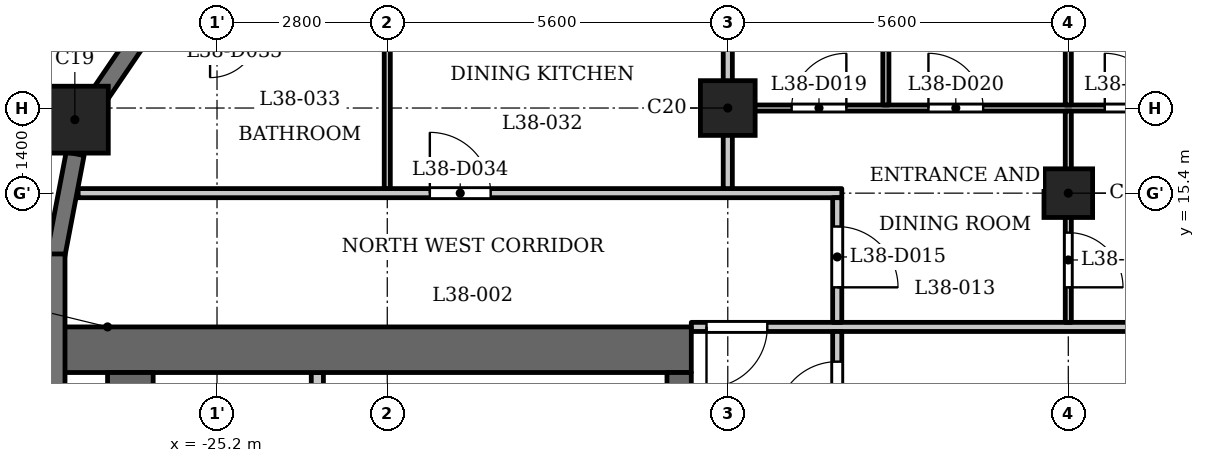
"""IFC4 building model, lengths in metres.
Left out: names, types, materials, properties, quantities, classifications, styles, units other than length and angle.
Written with IfcOpenShell. Run it as: python <this file> out.ifc"""

import sys

from ifc_helpers import new_model, si_unit, direction, frame, frame_2d, origin, origin_2d, place, context, subcontext, project, spatial, rectangle, extrude, element, fill, save


model = new_model("IFC4")
c1 = context("Model", 3, precision=1e-05, world=origin(), true_north=direction((0.0, 1.0)))
c2 = subcontext(c1, "Body", "Model", "MODEL_VIEW")
j1 = project(units=[si_unit("LENGTHUNIT", "METRE"), si_unit("PLANEANGLEUNIT", "RADIAN")], contexts=[c1])
p1 = place(None, origin())
s1 = spatial("IfcSite", under=j1, at=p1, CompositionType="ELEMENT")
p2 = place(p1, origin())
s2 = spatial("IfcBuilding", under=s1, at=p2, CompositionType="ELEMENT")
p3 = place(p2, frame((0.0, 0.0, 150.1)))
s3 = spatial("IfcBuildingStorey", under=s2, at=p3, CompositionType="ELEMENT", Elevation=150.1)
p4 = place(p3, frame((-27.538, 16.609, 0.0), z_axis=(0.0, 0.0, 1.0), x_axis=(1.0, 0.0, 0.0)))
e1 = element("IfcColumn", 1, at=p4, inside=s3, PredefinedType="COLUMN", context=c2, shape_type="SweptSolid", body=[
    extrude(rectangle(XDim=1.1, YDim=1.1, at=origin_2d()), origin(), (0.0, 0.0, 1.0), 3.5),
])
p5 = place(p3, frame((-16.8, 16.8, 0.0), z_axis=(0.0, 0.0, 1.0), x_axis=(1.0, 0.0, 0.0)))
e2 = element("IfcColumn", 2, at=p5, inside=s3, PredefinedType="COLUMN", context=c2, shape_type="SweptSolid", body=[
    extrude(rectangle(XDim=0.9, YDim=0.9, at=origin_2d()), origin(), (0.0, 0.0, 1.0), 3.5),
])
p6 = place(p3, frame((-11.2, 15.4, 0.0), z_axis=(0.0, 0.0, 1.0), x_axis=(1.0, 0.0, 0.0)))
e3 = element("IfcColumn", 3, at=p6, inside=s3, PredefinedType="COLUMN", context=c2, shape_type="SweptSolid", body=[
    extrude(rectangle(XDim=0.8, YDim=0.8, at=origin_2d()), origin(), (0.0, 0.0, 1.0), 3.5),
])
p7 = place(p3, frame((-26.532, 17.893, 0.0), z_axis=(0.0, 0.0, 1.0), x_axis=(-0.562105419172, -0.82706559458, 0.0)))
e4 = element("IfcWall", 4, at=p7, inside=s3, PredefinedType="SOLIDWALL", context=c2, shape_type="SweptSolid", body=[
    extrude(rectangle(XDim=1.077, YDim=0.3, at=frame_2d((0.539, 0.0))), origin(), (0.0, 0.0, 1.0), 3.2),
])
p8 = place(p3, frame((-27.533, 16.048, 0.0), z_axis=(0.0, 0.0, 1.0), x_axis=(-0.187302784601, -0.982302227871, 0.0)))
e5 = element("IfcWall", 5, at=p8, inside=s3, PredefinedType="SOLIDWALL", context=c2, shape_type="SweptSolid", body=[
    extrude(rectangle(XDim=1.706, YDim=0.3, at=frame_2d((0.853, 0.0))), origin(), (0.0, 0.0, 1.0), 2.45),
])
p9 = place(p3, frame((-27.85, 14.4, 0.0), z_axis=(0.0, 0.0, 1.0), x_axis=(0.0, -1.0, 0.0)))
e6 = element("IfcWall", 6, at=p9, inside=s3, PredefinedType="SOLIDWALL", context=c2, shape_type="SweptSolid", body=[
    extrude(rectangle(XDim=2.65, YDim=0.3, at=frame_2d((1.325, 0.0))), origin(), (0.0, 0.0, 1.0), 2.45),
])
p10 = place(p3, frame((-17.4, 12.825, 0.0), z_axis=(0.0, 0.0, 1.0), x_axis=(-1.0, 0.0, 0.0)))
e7 = element("IfcWall", 7, at=p10, inside=s3, PredefinedType="SHEAR", context=c2, shape_type="SweptSolid", body=[
    extrude(rectangle(XDim=10.4, YDim=0.75, at=frame_2d((5.2, 0.0))), origin(), (0.0, 0.0, 1.0), 3.2),
])
p11 = place(p3, frame((-17.6, -12.45, 0.0), z_axis=(0.0, 0.0, 1.0), x_axis=(0.0, 1.0, 0.0)))
e8 = element("IfcWall", 8, at=p11, inside=s3, PredefinedType="SHEAR", context=c2, shape_type="SweptSolid", body=[
    extrude(rectangle(XDim=24.9, YDim=0.4, at=frame_2d((12.45, 0.0))), origin(), (0.0, 0.0, 1.0), 3.2),
])
p12 = place(p11, frame((6.325, 0.0, 0.0)))
e9 = element("IfcOpeningElement", 9, at=p12, cuts=e8, PredefinedType="OPENING", context=c2, shape_type="SweptSolid", body=[
    extrude(rectangle(XDim=0.9, YDim=2.1, at=frame_2d((0.45, 1.05))), frame((0.0, 0.21, 0.0), z_axis=(0.0, -1.0, 0.0), x_axis=(1.0, 0.0, 0.0)), (0.0, 0.0, 1.0), 0.42),
])
p13 = place(p11, frame((9.925, 0.0, 0.0)))
e10 = element("IfcOpeningElement", 10, at=p13, cuts=e8, PredefinedType="OPENING", context=c2, shape_type="SweptSolid", body=[
    extrude(rectangle(XDim=0.9, YDim=2.1, at=frame_2d((0.45, 1.05))), frame((0.0, 0.21, 0.0), z_axis=(0.0, -1.0, 0.0), x_axis=(1.0, 0.0, 0.0)), (0.0, 0.0, 1.0), 0.42),
])
p14 = place(p11, frame((15.6, 0.0, 0.0)))
e11 = element("IfcOpeningElement", 11, at=p14, cuts=e8, PredefinedType="OPENING", context=c2, shape_type="SweptSolid", body=[
    extrude(rectangle(XDim=1.1, YDim=2.1, at=frame_2d((0.55, 1.05))), frame((0.0, 0.21, 0.0), z_axis=(0.0, -1.0, 0.0), x_axis=(1.0, 0.0, 0.0)), (0.0, 0.0, 1.0), 0.42),
])
p15 = place(p11, frame((18.0, 0.0, 0.0)))
e12 = element("IfcOpeningElement", 12, at=p15, cuts=e8, PredefinedType="OPENING", context=c2, shape_type="SweptSolid", body=[
    extrude(rectangle(XDim=1.1, YDim=2.1, at=frame_2d((0.55, 1.05))), frame((0.0, 0.21, 0.0), z_axis=(0.0, -1.0, 0.0), x_axis=(1.0, 0.0, 0.0)), (0.0, 0.0, 1.0), 0.42),
])
p16 = place(p11, frame((23.025, 0.0, 0.0)))
e13 = element("IfcOpeningElement", 13, at=p16, cuts=e8, PredefinedType="OPENING", context=c2, shape_type="SweptSolid", body=[
    extrude(rectangle(XDim=1.1, YDim=2.1, at=frame_2d((0.55, 1.05))), frame((0.0, 0.21, 0.0), z_axis=(0.0, -1.0, 0.0), x_axis=(1.0, 0.0, 0.0)), (0.0, 0.0, 1.0), 0.42),
])
p17 = place(p11, frame((0.775, 0.0, 0.0)))
e14 = element("IfcOpeningElement", 14, at=p17, cuts=e8, PredefinedType="OPENING", context=c2, shape_type="SweptSolid", body=[
    extrude(rectangle(XDim=1.1, YDim=2.1, at=frame_2d((0.55, 1.05))), frame((0.0, 0.21, 0.0), z_axis=(0.0, -1.0, 0.0), x_axis=(1.0, 0.0, 0.0)), (0.0, 0.0, 1.0), 0.42),
])
p18 = place(p11, frame((12.925, 0.0, 0.0)))
e15 = element("IfcOpeningElement", 15, at=p18, cuts=e8, PredefinedType="OPENING", context=c2, shape_type="SweptSolid", body=[
    extrude(rectangle(XDim=1.8, YDim=2.1, at=frame_2d((0.9, 1.05))), frame((0.0, 0.21, 0.0), z_axis=(0.0, -1.0, 0.0), x_axis=(1.0, 0.0, 0.0)), (0.0, 0.0, 1.0), 0.42),
])
p19 = place(p3, frame((-26.625, -12.45, 0.0), z_axis=(0.0, 0.0, 1.0), x_axis=(0.0, 1.0, 0.0)))
e16 = element("IfcWall", 16, at=p19, inside=s3, PredefinedType="SHEAR", context=c2, shape_type="SweptSolid", body=[
    extrude(rectangle(XDim=24.9, YDim=0.75, at=frame_2d((12.45, 0.0))), origin(), (0.0, 0.0, 1.0), 3.2),
])
p20 = place(p3, frame((-23.55, 9.8, 0.0), z_axis=(0.0, 0.0, 1.0), x_axis=(0.0, 1.0, 0.0)))
e17 = element("IfcWall", 17, at=p20, inside=s3, PredefinedType="PARTITIONING", context=c2, shape_type="SweptSolid", body=[
    extrude(rectangle(XDim=2.65, YDim=0.2, at=frame_2d((1.325, 0.0))), origin(), (0.0, 0.0, 1.0), 3.2),
])
p21 = place(p20, frame((0.875, 0.0, 0.0)))
e18 = element("IfcOpeningElement", 18, at=p21, cuts=e17, PredefinedType="OPENING", context=c2, shape_type="SweptSolid", body=[
    extrude(rectangle(XDim=0.9, YDim=2.1, at=frame_2d((0.45, 1.05))), frame((0.0, 0.11, 0.0), z_axis=(0.0, -1.0, 0.0), x_axis=(1.0, 0.0, 0.0)), (0.0, 0.0, 1.0), 0.22),
])
p22 = place(p3, frame((-17.4, 13.2, 0.0), z_axis=(0.0, 0.0, 1.0), x_axis=(1.0, 0.0, 0.0)))
e19 = element("IfcWall", 19, at=p22, inside=s3, PredefinedType="PARTITIONING", context=c2, shape_type="SweptSolid", body=[
    extrude(rectangle(XDim=34.8, YDim=0.15, at=frame_2d((17.4, 0.0))), origin(), (0.0, 0.0, 1.0), 3.2),
])
p23 = place(p22, frame((0.25, 0.0, 0.0)))
e20 = element("IfcOpeningElement", 20, at=p23, cuts=e19, PredefinedType="OPENING", context=c2, shape_type="SweptSolid", body=[
    extrude(rectangle(XDim=1.0, YDim=2.1, at=frame_2d((0.5, 1.05))), frame((0.0, 0.085, 0.0), z_axis=(0.0, -1.0, 0.0), x_axis=(1.0, 0.0, 0.0)), (0.0, 0.0, 1.0), 0.17),
])
p24 = place(p22, frame((33.65, 0.0, 0.0)))
e21 = element("IfcOpeningElement", 21, at=p24, cuts=e19, PredefinedType="OPENING", context=c2, shape_type="SweptSolid", body=[
    extrude(rectangle(XDim=1.0, YDim=2.1, at=frame_2d((0.5, 1.05))), frame((0.0, 0.085, 0.0), z_axis=(0.0, -1.0, 0.0), x_axis=(1.0, 0.0, 0.0)), (0.0, 0.0, 1.0), 0.17),
])
p25 = place(p22, frame((13.75, 0.0, 0.0)))
e22 = element("IfcOpeningElement", 22, at=p25, cuts=e19, PredefinedType="OPENING", context=c2, shape_type="SweptSolid", body=[
    extrude(rectangle(XDim=1.0, YDim=2.1, at=frame_2d((0.5, 1.05))), frame((0.0, 0.085, 0.0), z_axis=(0.0, -1.0, 0.0), x_axis=(1.0, 0.0, 0.0)), (0.0, 0.0, 1.0), 0.17),
])
p26 = place(p3, frame((-27.484, 15.4, 0.0), z_axis=(0.0, 0.0, 1.0), x_axis=(1.0, 0.0, 0.0)))
e23 = element("IfcWall", 23, at=p26, inside=s3, PredefinedType="PARTITIONING", context=c2, shape_type="SweptSolid", body=[
    extrude(rectangle(XDim=12.559, YDim=0.15, at=frame_2d((6.279, 0.0))), origin(), (0.0, 0.0, 1.0), 3.2),
])
p27 = place(p26, frame((5.784, 0.0, 0.0)))
e24 = element("IfcOpeningElement", 24, at=p27, cuts=e23, PredefinedType="OPENING", context=c2, shape_type="SweptSolid", body=[
    extrude(rectangle(XDim=1.0, YDim=2.1, at=frame_2d((0.5, 1.05))), frame((0.0, 0.085, 0.0), z_axis=(0.0, -1.0, 0.0), x_axis=(1.0, 0.0, 0.0)), (0.0, 0.0, 1.0), 0.17),
])
p28 = place(p3, frame((-16.725, 16.8, 0.0), z_axis=(0.0, 0.0, 1.0), x_axis=(1.0, 0.0, 0.0)))
e25 = element("IfcWall", 25, at=p28, inside=s3, PredefinedType="PARTITIONING", context=c2, shape_type="SweptSolid", body=[
    extrude(rectangle(XDim=33.45, YDim=0.1, at=frame_2d((16.725, 0.0))), origin(), (0.0, 0.0, 1.0), 3.2),
])
p29 = place(p28, frame((9.575, 0.0, 0.0)))
e26 = element("IfcOpeningElement", 26, at=p29, cuts=e25, PredefinedType="OPENING", context=c2, shape_type="SweptSolid", body=[
    extrude(rectangle(XDim=0.8, YDim=2.1, at=frame_2d((0.4, 1.05))), frame((0.0, 0.06, 0.0), z_axis=(0.0, -1.0, 0.0), x_axis=(1.0, 0.0, 0.0)), (0.0, 0.0, 1.0), 0.12),
])
p30 = place(p28, frame((6.125, 0.0, 0.0)))
e27 = element("IfcOpeningElement", 27, at=p30, cuts=e25, PredefinedType="OPENING", context=c2, shape_type="SweptSolid", body=[
    extrude(rectangle(XDim=0.9, YDim=2.1, at=frame_2d((0.45, 1.05))), frame((0.0, 0.06, 0.0), z_axis=(0.0, -1.0, 0.0), x_axis=(1.0, 0.0, 0.0)), (0.0, 0.0, 1.0), 0.12),
])
p31 = place(p28, frame((0.975, 0.0, 0.0)))
e28 = element("IfcOpeningElement", 28, at=p31, cuts=e25, PredefinedType="OPENING", context=c2, shape_type="SweptSolid", body=[
    extrude(rectangle(XDim=0.9, YDim=2.1, at=frame_2d((0.45, 1.05))), frame((0.0, 0.06, 0.0), z_axis=(0.0, -1.0, 0.0), x_axis=(1.0, 0.0, 0.0)), (0.0, 0.0, 1.0), 0.12),
])
p32 = place(p28, frame((3.225, 0.0, 0.0)))
e29 = element("IfcOpeningElement", 29, at=p32, cuts=e25, PredefinedType="OPENING", context=c2, shape_type="SweptSolid", body=[
    extrude(rectangle(XDim=0.9, YDim=2.1, at=frame_2d((0.45, 1.05))), frame((0.0, 0.06, 0.0), z_axis=(0.0, -1.0, 0.0), x_axis=(1.0, 0.0, 0.0)), (0.0, 0.0, 1.0), 0.12),
])
p33 = place(p28, frame((15.375, 0.0, 0.0)))
e30 = element("IfcOpeningElement", 30, at=p33, cuts=e25, PredefinedType="OPENING", context=c2, shape_type="SweptSolid", body=[
    extrude(rectangle(XDim=0.8, YDim=2.1, at=frame_2d((0.4, 1.05))), frame((0.0, 0.06, 0.0), z_axis=(0.0, -1.0, 0.0), x_axis=(1.0, 0.0, 0.0)), (0.0, 0.0, 1.0), 0.12),
])
p34 = place(p28, frame((13.175, 0.0, 0.0)))
e31 = element("IfcOpeningElement", 31, at=p34, cuts=e25, PredefinedType="OPENING", context=c2, shape_type="SweptSolid", body=[
    extrude(rectangle(XDim=0.9, YDim=2.1, at=frame_2d((0.45, 1.05))), frame((0.0, 0.06, 0.0), z_axis=(0.0, -1.0, 0.0), x_axis=(1.0, 0.0, 0.0)), (0.0, 0.0, 1.0), 0.12),
])
p35 = place(p28, frame((31.975, 0.0, 0.0)))
e32 = element("IfcOpeningElement", 32, at=p35, cuts=e25, PredefinedType="OPENING", context=c2, shape_type="SweptSolid", body=[
    extrude(rectangle(XDim=0.9, YDim=2.1, at=frame_2d((0.45, 1.05))), frame((0.0, 0.06, 0.0), z_axis=(0.0, -1.0, 0.0), x_axis=(1.0, 0.0, 0.0)), (0.0, 0.0, 1.0), 0.12),
])
p36 = place(p28, frame((22.875, 0.0, 0.0)))
e33 = element("IfcOpeningElement", 33, at=p36, cuts=e25, PredefinedType="OPENING", context=c2, shape_type="SweptSolid", body=[
    extrude(rectangle(XDim=0.9, YDim=2.1, at=frame_2d((0.45, 1.05))), frame((0.0, 0.06, 0.0), z_axis=(0.0, -1.0, 0.0), x_axis=(1.0, 0.0, 0.0)), (0.0, 0.0, 1.0), 0.12),
])
p37 = place(p3, frame((-22.4, 15.475, 0.0), z_axis=(0.0, 0.0, 1.0), x_axis=(0.0, 1.0, 0.0)))
e34 = element("IfcWall", 34, at=p37, inside=s3, PredefinedType="PARTITIONING", context=c2, shape_type="SweptSolid", body=[
    extrude(rectangle(XDim=2.575, YDim=0.1, at=frame_2d((1.288, 0.0))), origin(), (0.0, 0.0, 1.0), 3.2),
])
p38 = place(p3, frame((-16.8, 15.475, 0.0), z_axis=(0.0, 0.0, 1.0), x_axis=(0.0, 1.0, 0.0)))
e35 = element("IfcWall", 35, at=p38, inside=s3, PredefinedType="PARTITIONING", context=c2, shape_type="SweptSolid", body=[
    extrude(rectangle(XDim=7.455, YDim=0.15, at=frame_2d((3.728, 0.0))), origin(), (0.0, 0.0, 1.0), 3.2),
])
p39 = place(p3, frame((-15.0, 6.769, 0.0), z_axis=(0.0, 0.0, 1.0), x_axis=(0.0, 1.0, 0.0)))
e36 = element("IfcWall", 36, at=p39, inside=s3, PredefinedType="PARTITIONING", context=c2, shape_type="SweptSolid", body=[
    extrude(rectangle(XDim=6.356, YDim=0.15, at=frame_2d((3.178, 0.0))), origin(), (0.0, 0.0, 1.0), 3.2),
])
p40 = place(p39, frame((4.86, 0.0, 0.0)))
e37 = element("IfcOpeningElement", 37, at=p40, cuts=e36, PredefinedType="OPENING", context=c2, shape_type="SweptSolid", body=[
    extrude(rectangle(XDim=1.0, YDim=2.1, at=frame_2d((0.5, 1.05))), frame((0.0, 0.085, 0.0), z_axis=(0.0, -1.0, 0.0), x_axis=(1.0, 0.0, 0.0)), (0.0, 0.0, 1.0), 0.17),
])
p41 = place(p3, frame((-15.0, 13.275, 0.0), z_axis=(0.0, 0.0, 1.0), x_axis=(0.0, 1.0, 0.0)))
e38 = element("IfcWall", 38, at=p41, inside=s3, PredefinedType="PARTITIONING", context=c2, shape_type="SweptSolid", body=[
    extrude(rectangle(XDim=2.05, YDim=0.15, at=frame_2d((1.025, 0.0))), origin(), (0.0, 0.0, 1.0), 3.2),
])
p42 = place(p41, frame((0.576, 0.0, 0.0)))
e39 = element("IfcOpeningElement", 39, at=p42, cuts=e38, PredefinedType="OPENING", context=c2, shape_type="SweptSolid", body=[
    extrude(rectangle(XDim=1.0, YDim=2.1, at=frame_2d((0.5, 1.05))), frame((0.0, 0.085, 0.0), z_axis=(0.0, -1.0, 0.0), x_axis=(1.0, 0.0, 0.0)), (0.0, 0.0, 1.0), 0.17),
])
p43 = place(p3, frame((-14.2, 16.85, 0.0), z_axis=(0.0, 0.0, 1.0), x_axis=(0.0, 1.0, 0.0)))
e40 = element("IfcWall", 40, at=p43, inside=s3, PredefinedType="PARTITIONING", context=c2, shape_type="SweptSolid", body=[
    extrude(rectangle(XDim=5.23, YDim=0.1, at=frame_2d((2.615, 0.0))), origin(), (0.0, 0.0, 1.0), 3.2),
])
p44 = place(p3, frame((-11.2, 13.275, 0.0), z_axis=(0.0, 0.0, 1.0), x_axis=(0.0, 1.0, 0.0)))
e41 = element("IfcWall", 41, at=p44, inside=s3, PredefinedType="PARTITIONING", context=c2, shape_type="SweptSolid", body=[
    extrude(rectangle(XDim=3.475, YDim=0.1, at=frame_2d((1.738, 0.0))), origin(), (0.0, 0.0, 1.0), 3.2),
])
p45 = place(p44, frame((0.576, 0.0, 0.0)))
e42 = element("IfcOpeningElement", 42, at=p45, cuts=e41, PredefinedType="OPENING", context=c2, shape_type="SweptSolid", body=[
    extrude(rectangle(XDim=0.9, YDim=2.1, at=frame_2d((0.45, 1.05))), frame((0.0, 0.06, 0.0), z_axis=(0.0, -1.0, 0.0), x_axis=(1.0, 0.0, 0.0)), (0.0, 0.0, 1.0), 0.12),
])
p46 = place(p3, frame((-11.2, 16.85, 0.0), z_axis=(0.0, 0.0, 1.0), x_axis=(0.0, 1.0, 0.0)))
e43 = element("IfcWall", 43, at=p46, inside=s3, PredefinedType="PARTITIONING", context=c2, shape_type="SweptSolid", body=[
    extrude(rectangle(XDim=6.08, YDim=0.1, at=frame_2d((3.04, 0.0))), origin(), (0.0, 0.0, 1.0), 3.2),
])
p47 = place(p40, origin())
e44 = element("IfcDoor", 44, at=p47, inside=s3, OperationType="SINGLE_SWING_RIGHT", PredefinedType="DOOR", context=c2, shape_type="SweptSolid", body=[
    extrude(rectangle(XDim=1.0, YDim=2.1, at=frame_2d((0.5, 1.05))), frame((0.0, 0.025, 0.0), z_axis=(0.0, -1.0, 0.0), x_axis=(1.0, 0.0, 0.0)), (0.0, 0.0, 1.0), 0.05),
])
fill(e37, e44)
p48 = place(p23, origin())
e45 = element("IfcDoor", 45, at=p48, inside=s3, OperationType="SINGLE_SWING_LEFT", PredefinedType="DOOR", context=c2, shape_type="SweptSolid", body=[
    extrude(rectangle(XDim=1.0, YDim=2.1, at=frame_2d((0.5, 1.05))), frame((0.0, 0.025, 0.0), z_axis=(0.0, -1.0, 0.0), x_axis=(1.0, 0.0, 0.0)), (0.0, 0.0, 1.0), 0.05),
])
fill(e20, e45)
p49 = place(p42, origin())
e46 = element("IfcDoor", 46, at=p49, inside=s3, OperationType="SINGLE_SWING_LEFT", PredefinedType="DOOR", context=c2, shape_type="SweptSolid", body=[
    extrude(rectangle(XDim=1.0, YDim=2.1, at=frame_2d((0.5, 1.05))), frame((0.0, 0.025, 0.0), z_axis=(0.0, -1.0, 0.0), x_axis=(1.0, 0.0, 0.0)), (0.0, 0.0, 1.0), 0.05),
])
fill(e39, e46)
p50 = place(p45, origin())
e47 = element("IfcDoor", 47, at=p50, inside=s3, OperationType="SINGLE_SWING_LEFT", PredefinedType="DOOR", context=c2, shape_type="SweptSolid", body=[
    extrude(rectangle(XDim=0.9, YDim=2.1, at=frame_2d((0.45, 1.05))), frame((0.0, 0.025, 0.0), z_axis=(0.0, -1.0, 0.0), x_axis=(1.0, 0.0, 0.0)), (0.0, 0.0, 1.0), 0.05),
])
fill(e42, e47)
p51 = place(p30, origin())
e48 = element("IfcDoor", 48, at=p51, inside=s3, OperationType="SINGLE_SWING_RIGHT", PredefinedType="DOOR", context=c2, shape_type="SweptSolid", body=[
    extrude(rectangle(XDim=0.9, YDim=2.1, at=frame_2d((0.45, 1.05))), frame((0.0, 0.025, 0.0), z_axis=(0.0, -1.0, 0.0), x_axis=(1.0, 0.0, 0.0)), (0.0, 0.0, 1.0), 0.05),
])
fill(e27, e48)
p52 = place(p31, origin())
e49 = element("IfcDoor", 49, at=p52, inside=s3, OperationType="SINGLE_SWING_LEFT", PredefinedType="DOOR", context=c2, shape_type="SweptSolid", body=[
    extrude(rectangle(XDim=0.9, YDim=2.1, at=frame_2d((0.45, 1.05))), frame((0.0, 0.025, 0.0), z_axis=(0.0, -1.0, 0.0), x_axis=(1.0, 0.0, 0.0)), (0.0, 0.0, 1.0), 0.05),
])
fill(e28, e49)
p53 = place(p32, origin())
e50 = element("IfcDoor", 50, at=p53, inside=s3, OperationType="SINGLE_SWING_RIGHT", PredefinedType="DOOR", context=c2, shape_type="SweptSolid", body=[
    extrude(rectangle(XDim=0.9, YDim=2.1, at=frame_2d((0.45, 1.05))), frame((0.0, 0.025, 0.0), z_axis=(0.0, -1.0, 0.0), x_axis=(1.0, 0.0, 0.0)), (0.0, 0.0, 1.0), 0.05),
])
fill(e29, e50)
p54 = place(p27, origin())
e51 = element("IfcDoor", 51, at=p54, inside=s3, OperationType="SINGLE_SWING_RIGHT", PredefinedType="DOOR", context=c2, shape_type="SweptSolid", body=[
    extrude(rectangle(XDim=1.0, YDim=2.1, at=frame_2d((0.5, 1.05))), frame((0.0, 0.025, 0.0), z_axis=(0.0, -1.0, 0.0), x_axis=(1.0, 0.0, 0.0)), (0.0, 0.0, 1.0), 0.05),
])
fill(e24, e51)
save(model, sys.argv[1])
